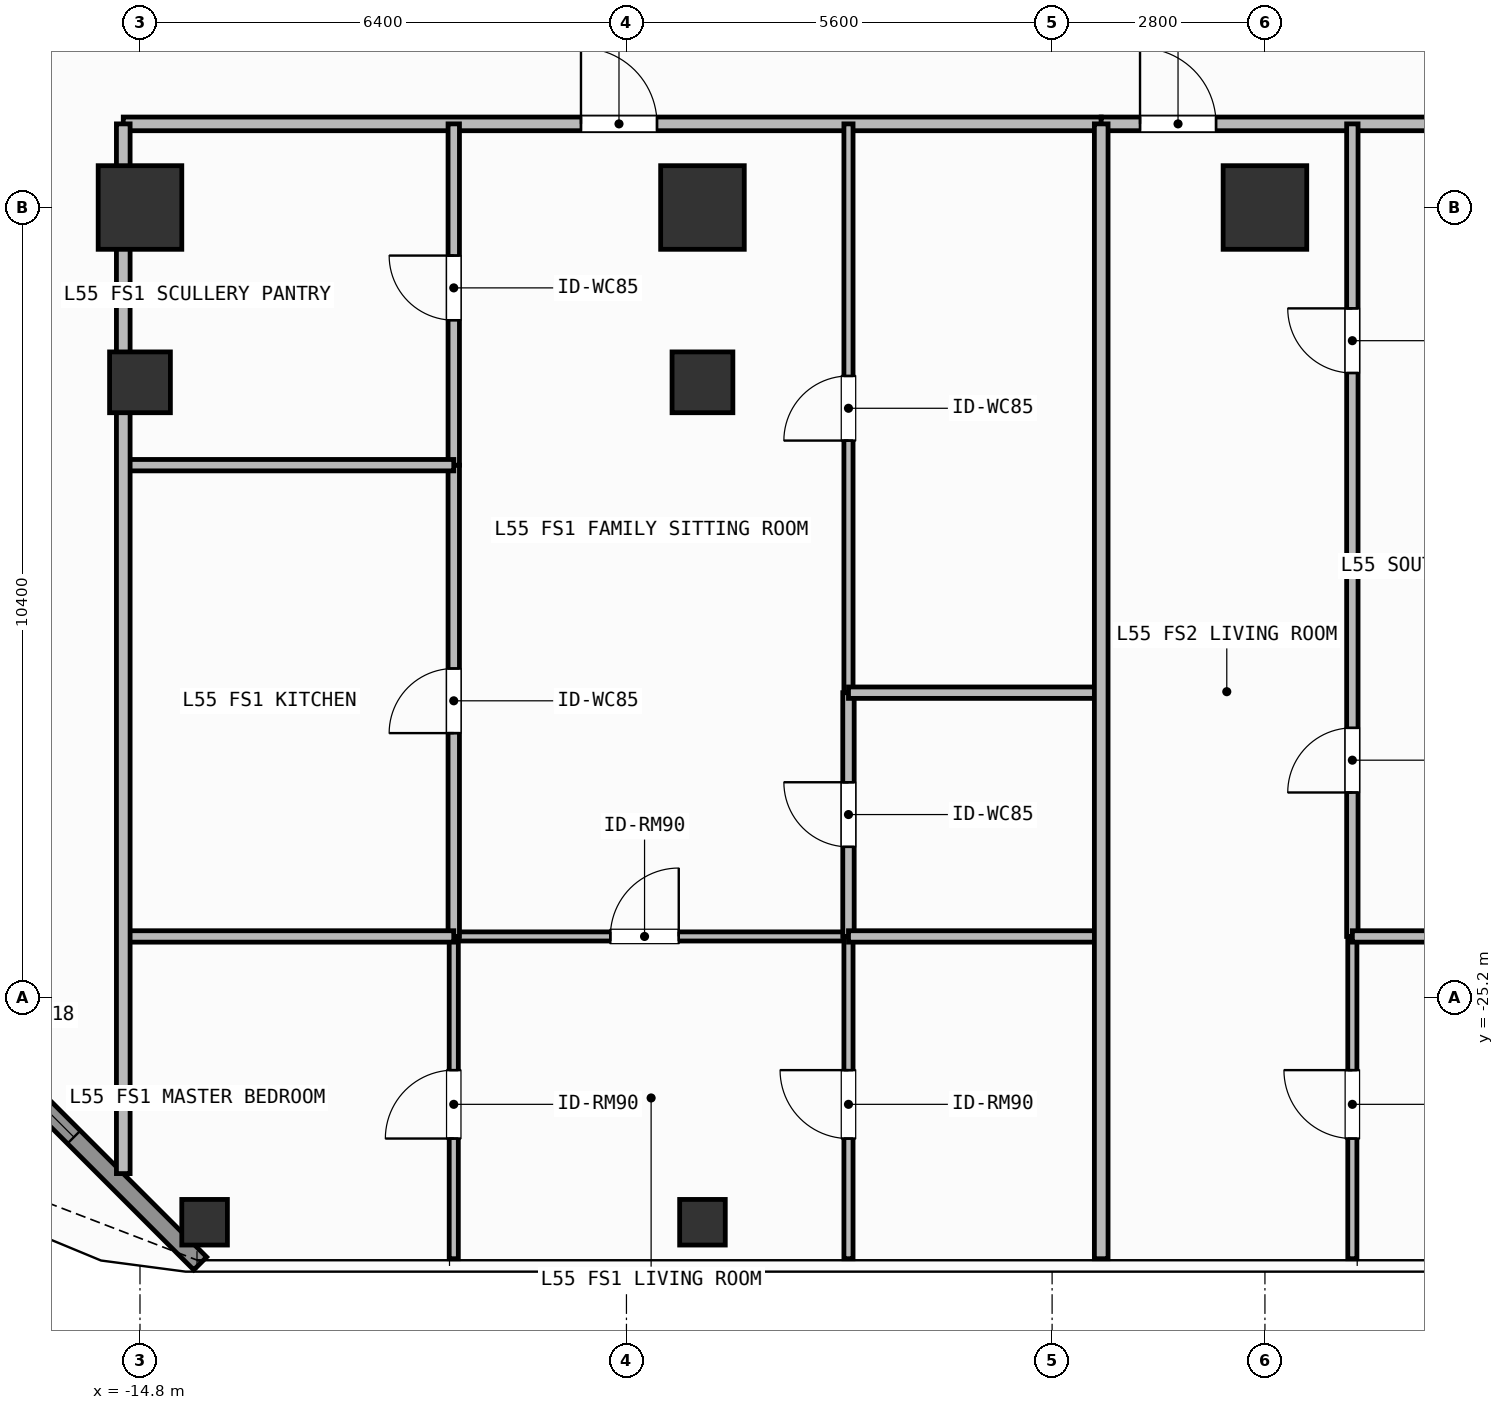
"""IFC4 building model, lengths in metres.
Left out: names, types, materials, properties, quantities, classifications, styles, units other than length and angle.
Written with IfcOpenShell. Run it as: python <this file> out.ifc"""

import sys

from ifc_helpers import new_model, si_unit, direction, frame, frame_2d, origin, origin_2d, place, context, subcontext, project, spatial, rectangle, hollow_rectangle, extrude, element, fill, save


model = new_model("IFC4")
c1 = context("Model", 3, precision=1e-05, world=origin(), true_north=direction((0.0, 1.0)))
c2 = subcontext(c1, "Body", "Model", "MODEL_VIEW")
j1 = project(units=[si_unit("LENGTHUNIT", "METRE"), si_unit("PLANEANGLEUNIT", "RADIAN")], contexts=[c1])
p1 = place(None, origin())
s1 = spatial("IfcSite", under=j1, at=p1, CompositionType="ELEMENT")
p2 = place(p1, origin())
s2 = spatial("IfcBuilding", under=s1, at=p2, CompositionType="ELEMENT")
p3 = place(p2, frame((0.0, 0.0, 223.5)))
s3 = spatial("IfcBuildingStorey", under=s2, at=p3, CompositionType="ELEMENT", Elevation=223.5)
for number, where, z_axis, x_axis in (
    (1, (-14.8, -14.8, 0.0), (0.0, 0.0, 1.0), (1.0, 0.0, 0.0)),
    (2, (-7.4, -14.8, 0.0), (0.0, 0.0, 1.0), (1.0, 0.0, 0.0)),
    (3, (0.0, -14.8, 0.0), (0.0, 0.0, 1.0), (1.0, 0.0, 0.0)),
):
    element("IfcColumn", number, at=place(p3, frame(where, z_axis=z_axis, x_axis=x_axis)), inside=s3, PredefinedType="COLUMN", context=c2, shape_type="SweptSolid", body=[
        extrude(rectangle(XDim=1.1, YDim=1.1, at=origin_2d()), origin(), (0.0, 0.0, 1.0), 3.9),
    ])
for number, where, z_axis, x_axis in (
    (4, (-14.8, -17.1, 0.0), (0.0, 0.0, 1.0), (1.0, 0.0, 0.0)),
    (5, (-7.4, -17.1, 0.0), (0.0, 0.0, 1.0), (1.0, 0.0, 0.0)),
):
    element("IfcColumn", number, at=place(p3, frame(where, z_axis=z_axis, x_axis=x_axis)), inside=s3, PredefinedType="COLUMN", context=c2, shape_type="SweptSolid", body=[
        extrude(hollow_rectangle(XDim=0.8, YDim=0.8, WallThickness=0.036, at=origin_2d()), origin(), (0.0, 0.0, 1.0), 3.9),
    ])
for number, where, z_axis, x_axis in (
    (6, (-13.95, -28.15, 0.0), (0.0, 0.0, 1.0), (1.0, 0.0, 0.0)),
    (7, (-7.4, -28.15, 0.0), (0.0, 0.0, 1.0), (1.0, 0.0, 0.0)),
):
    element("IfcColumn", number, at=place(p3, frame(where, z_axis=z_axis, x_axis=x_axis)), inside=s3, PredefinedType="COLUMN", context=c2, shape_type="SweptSolid", body=[
        extrude(hollow_rectangle(XDim=0.6, YDim=0.6, WallThickness=0.028, at=origin_2d()), origin(), (0.0, 0.0, 1.0), 3.9),
    ])
p4 = place(p3, frame((-14.008, -28.692, 0.0), z_axis=(0.0, 0.0, 1.0), x_axis=(-0.707106781187, 0.707106781187, 0.0)))
e8 = element("IfcWall", 8, at=p4, inside=s3, PredefinedType="SOLIDWALL", context=c2, shape_type="SweptSolid", body=[
    extrude(rectangle(XDim=6.201, YDim=0.24, at=frame_2d((3.101, 0.0))), origin(), (0.0, 0.0, 1.0), 3.68),
])
p5 = place(p4, frame((2.351, 0.0, 0.8)))
e9 = element("IfcOpeningElement", 9, at=p5, cuts=e8, PredefinedType="OPENING", context=c2, shape_type="SweptSolid", body=[
    extrude(rectangle(XDim=1.5, YDim=1.85, at=frame_2d((0.75, 0.925))), frame((0.0, 0.13, 0.0), z_axis=(0.0, -1.0, 0.0), x_axis=(1.0, 0.0, 0.0)), (0.0, 0.0, 1.0), 0.26),
])
p6 = place(p3, frame((-15.02, -13.7, 0.0), z_axis=(0.0, 0.0, 1.0), x_axis=(1.0, 0.0, 0.0)))
e10 = element("IfcWall", 10, at=p6, inside=s3, PredefinedType="PARTITIONING", context=c2, shape_type="SweptSolid", body=[
    extrude(rectangle(XDim=12.866, YDim=0.18, at=frame_2d((6.433, 0.0))), origin(), (0.0, 0.0, 1.0), 3.68),
])
p7 = place(p6, frame((6.022, 0.0, 0.0)))
e11 = element("IfcOpeningElement", 11, at=p7, cuts=e10, PredefinedType="OPENING", context=c2, shape_type="SweptSolid", body=[
    extrude(rectangle(XDim=1.0, YDim=2.2, at=frame_2d((0.5, 1.1))), frame((0.0, 0.1, 0.0), z_axis=(0.0, -1.0, 0.0), x_axis=(1.0, 0.0, 0.0)), (0.0, 0.0, 1.0), 0.2),
])
p8 = place(p3, frame((-10.672, -24.39, 0.0), z_axis=(0.0, 0.0, 1.0), x_axis=(1.0, 0.0, 0.0)))
e12 = element("IfcWall", 12, at=p8, inside=s3, PredefinedType="PARTITIONING", context=c2, shape_type="SweptSolid", body=[
    extrude(rectangle(XDim=5.193, YDim=0.12, at=frame_2d((2.597, 0.0))), origin(), (0.0, 0.0, 1.0), 3.68),
])
p9 = place(p8, frame((2.06, 0.0, 0.0)))
e13 = element("IfcOpeningElement", 13, at=p9, cuts=e12, PredefinedType="OPENING", context=c2, shape_type="SweptSolid", body=[
    extrude(rectangle(XDim=0.9, YDim=2.1, at=frame_2d((0.45, 1.05))), frame((0.0, 0.07, 0.0), z_axis=(0.0, -1.0, 0.0), x_axis=(1.0, 0.0, 0.0)), (0.0, 0.0, 1.0), 0.14),
])
p10 = place(p3, frame((-10.672, -24.39, 0.0), z_axis=(0.0, 0.0, 1.0), x_axis=(0.0, 1.0, 0.0)))
e14 = element("IfcWall", 14, at=p10, inside=s3, PredefinedType="PARTITIONING", context=c2, shape_type="SweptSolid", body=[
    extrude(rectangle(XDim=6.2, YDim=0.15, at=frame_2d((3.1, 0.0))), origin(), (0.0, 0.0, 1.0), 3.68),
])
p11 = place(p10, frame((2.675, 0.0, 0.0)))
e15 = element("IfcOpeningElement", 15, at=p11, cuts=e14, PredefinedType="OPENING", context=c2, shape_type="SweptSolid", body=[
    extrude(rectangle(XDim=0.85, YDim=2.1, at=frame_2d((0.425, 1.05))), frame((0.0, 0.085, 0.0), z_axis=(0.0, -1.0, 0.0), x_axis=(1.0, 0.0, 0.0)), (0.0, 0.0, 1.0), 0.17),
])
p12 = place(p3, frame((-10.672, -18.19, 0.0), z_axis=(0.0, 0.0, 1.0), x_axis=(0.0, 1.0, 0.0)))
e16 = element("IfcWall", 16, at=p12, inside=s3, PredefinedType="PARTITIONING", context=c2, shape_type="SweptSolid", body=[
    extrude(rectangle(XDim=4.49, YDim=0.15, at=frame_2d((2.245, 0.0))), origin(), (0.0, 0.0, 1.0), 3.68),
])
p13 = place(p12, frame((1.907, 0.0, 0.0)))
e17 = element("IfcOpeningElement", 17, at=p13, cuts=e16, PredefinedType="OPENING", context=c2, shape_type="SweptSolid", body=[
    extrude(rectangle(XDim=0.85, YDim=2.1, at=frame_2d((0.425, 1.05))), frame((0.0, 0.085, 0.0), z_axis=(0.0, -1.0, 0.0), x_axis=(1.0, 0.0, 0.0)), (0.0, 0.0, 1.0), 0.17),
])
p14 = place(p3, frame((-10.672, -28.63, 0.0), z_axis=(0.0, 0.0, 1.0), x_axis=(0.0, 1.0, 0.0)))
e18 = element("IfcWall", 18, at=p14, inside=s3, PredefinedType="PARTITIONING", context=c2, shape_type="SweptSolid", body=[
    extrude(rectangle(XDim=4.24, YDim=0.12, at=frame_2d((2.12, 0.0))), origin(), (0.0, 0.0, 1.0), 3.68),
])
p15 = place(p14, frame((1.581, 0.0, 0.0)))
e19 = element("IfcOpeningElement", 19, at=p15, cuts=e18, PredefinedType="OPENING", context=c2, shape_type="SweptSolid", body=[
    extrude(rectangle(XDim=0.9, YDim=2.1, at=frame_2d((0.45, 1.05))), frame((0.0, 0.07, 0.0), z_axis=(0.0, -1.0, 0.0), x_axis=(1.0, 0.0, 0.0)), (0.0, 0.0, 1.0), 0.14),
])
p16 = place(p3, frame((-5.479, -24.39, 0.0), z_axis=(0.0, 0.0, 1.0), x_axis=(0.0, 1.0, 0.0)))
e20 = element("IfcWall", 20, at=p16, inside=s3, PredefinedType="PARTITIONING", context=c2, shape_type="SweptSolid", body=[
    extrude(rectangle(XDim=3.207, YDim=0.15, at=frame_2d((1.604, 0.0))), origin(), (0.0, 0.0, 1.0), 3.68),
])
p17 = place(p16, frame((1.178, 0.0, 0.0)))
e21 = element("IfcOpeningElement", 21, at=p17, cuts=e20, PredefinedType="OPENING", context=c2, shape_type="SweptSolid", body=[
    extrude(rectangle(XDim=0.85, YDim=2.1, at=frame_2d((0.425, 1.05))), frame((0.0, 0.085, 0.0), z_axis=(0.0, -1.0, 0.0), x_axis=(1.0, 0.0, 0.0)), (0.0, 0.0, 1.0), 0.17),
])
p18 = place(p3, frame((-5.479, -21.183, 0.0), z_axis=(0.0, 0.0, 1.0), x_axis=(0.0, 1.0, 0.0)))
e22 = element("IfcWall", 22, at=p18, inside=s3, PredefinedType="PARTITIONING", context=c2, shape_type="SweptSolid", body=[
    extrude(rectangle(XDim=7.483, YDim=0.12, at=frame_2d((3.742, 0.0))), origin(), (0.0, 0.0, 1.0), 3.68),
])
p19 = place(p18, frame((3.316, 0.0, 0.0)))
e23 = element("IfcOpeningElement", 23, at=p19, cuts=e22, PredefinedType="OPENING", context=c2, shape_type="SweptSolid", body=[
    extrude(rectangle(XDim=0.85, YDim=2.1, at=frame_2d((0.425, 1.05))), frame((0.0, 0.07, 0.0), z_axis=(0.0, -1.0, 0.0), x_axis=(1.0, 0.0, 0.0)), (0.0, 0.0, 1.0), 0.14),
])
p20 = place(p3, frame((-5.479, -28.63, 0.0), z_axis=(0.0, 0.0, 1.0), x_axis=(0.0, 1.0, 0.0)))
e24 = element("IfcWall", 24, at=p20, inside=s3, PredefinedType="PARTITIONING", context=c2, shape_type="SweptSolid", body=[
    extrude(rectangle(XDim=4.24, YDim=0.12, at=frame_2d((2.12, 0.0))), origin(), (0.0, 0.0, 1.0), 3.68),
])
p21 = place(p20, frame((1.581, 0.0, 0.0)))
e25 = element("IfcOpeningElement", 25, at=p21, cuts=e24, PredefinedType="OPENING", context=c2, shape_type="SweptSolid", body=[
    extrude(rectangle(XDim=0.9, YDim=2.1, at=frame_2d((0.45, 1.05))), frame((0.0, 0.07, 0.0), z_axis=(0.0, -1.0, 0.0), x_axis=(1.0, 0.0, 0.0)), (0.0, 0.0, 1.0), 0.14),
])
p22 = place(p3, frame((-2.154, -13.7, 0.0), z_axis=(0.0, 0.0, 1.0), x_axis=(1.0, 0.0, 0.0)))
e26 = element("IfcWall", 26, at=p22, inside=s3, PredefinedType="PARTITIONING", context=c2, shape_type="SweptSolid", body=[
    extrude(rectangle(XDim=6.054, YDim=0.18, at=frame_2d((3.027, 0.0))), origin(), (0.0, 0.0, 1.0), 3.68),
])
p23 = place(p22, frame((0.511, 0.0, 0.0)))
e27 = element("IfcOpeningElement", 27, at=p23, cuts=e26, PredefinedType="OPENING", context=c2, shape_type="SweptSolid", body=[
    extrude(rectangle(XDim=1.0, YDim=2.2, at=frame_2d((0.5, 1.1))), frame((0.0, 0.1, 0.0), z_axis=(0.0, -1.0, 0.0), x_axis=(1.0, 0.0, 0.0)), (0.0, 0.0, 1.0), 0.2),
])
p24 = place(p3, frame((1.15, -19.579, 0.0), z_axis=(0.0, 0.0, 1.0), x_axis=(0.0, 1.0, 0.0)))
e28 = element("IfcWall", 28, at=p24, inside=s3, PredefinedType="PARTITIONING", context=c2, shape_type="SweptSolid", body=[
    extrude(rectangle(XDim=5.879, YDim=0.15, at=frame_2d((2.939, 0.0))), origin(), (0.0, 0.0, 1.0), 3.68),
])
p25 = place(p24, frame((2.602, 0.0, 0.0)))
e29 = element("IfcOpeningElement", 29, at=p25, cuts=e28, PredefinedType="OPENING", context=c2, shape_type="SweptSolid", body=[
    extrude(rectangle(XDim=0.85, YDim=2.1, at=frame_2d((0.425, 1.05))), frame((0.0, 0.085, 0.0), z_axis=(0.0, -1.0, 0.0), x_axis=(1.0, 0.0, 0.0)), (0.0, 0.0, 1.0), 0.17),
])
p26 = place(p3, frame((1.15, -24.39, 0.0), z_axis=(0.0, 0.0, 1.0), x_axis=(0.0, 1.0, 0.0)))
e30 = element("IfcWall", 30, at=p26, inside=s3, PredefinedType="PARTITIONING", context=c2, shape_type="SweptSolid", body=[
    extrude(rectangle(XDim=4.811, YDim=0.15, at=frame_2d((2.405, 0.0))), origin(), (0.0, 0.0, 1.0), 3.68),
])
p27 = place(p26, frame((1.894, 0.0, 0.0)))
e31 = element("IfcOpeningElement", 31, at=p27, cuts=e30, PredefinedType="OPENING", context=c2, shape_type="SweptSolid", body=[
    extrude(rectangle(XDim=0.85, YDim=2.1, at=frame_2d((0.425, 1.05))), frame((0.0, 0.085, 0.0), z_axis=(0.0, -1.0, 0.0), x_axis=(1.0, 0.0, 0.0)), (0.0, 0.0, 1.0), 0.17),
])
p28 = place(p3, frame((1.15, -28.63, 0.0), z_axis=(0.0, 0.0, 1.0), x_axis=(0.0, 1.0, 0.0)))
e32 = element("IfcWall", 32, at=p28, inside=s3, PredefinedType="PARTITIONING", context=c2, shape_type="SweptSolid", body=[
    extrude(rectangle(XDim=4.24, YDim=0.12, at=frame_2d((2.12, 0.0))), origin(), (0.0, 0.0, 1.0), 3.68),
])
p29 = place(p28, frame((1.581, 0.0, 0.0)))
e33 = element("IfcOpeningElement", 33, at=p29, cuts=e32, PredefinedType="OPENING", context=c2, shape_type="SweptSolid", body=[
    extrude(rectangle(XDim=0.9, YDim=2.1, at=frame_2d((0.45, 1.05))), frame((0.0, 0.07, 0.0), z_axis=(0.0, -1.0, 0.0), x_axis=(1.0, 0.0, 0.0)), (0.0, 0.0, 1.0), 0.14),
])
for number, where, z_axis, x_axis in (
    (34, (-15.02, -18.19, 0.0), (0.0, 0.0, 1.0), (1.0, 0.0, 0.0)),
    (35, (-15.02, -24.39, 0.0), (0.0, 0.0, 1.0), (1.0, 0.0, 0.0)),
):
    element("IfcWall", number, at=place(p3, frame(where, z_axis=z_axis, x_axis=x_axis)), inside=s3, PredefinedType="PARTITIONING", context=c2, shape_type="SweptSolid", body=[
        extrude(rectangle(XDim=4.348, YDim=0.15, at=frame_2d((2.174, 0.0))), origin(), (0.0, 0.0, 1.0), 3.68),
    ])
for number, where, z_axis, x_axis in (
    (36, (-5.479, -21.183, 0.0), (0.0, 0.0, 1.0), (1.0, 0.0, 0.0)),
    (37, (-5.479, -24.39, 0.0), (0.0, 0.0, 1.0), (1.0, 0.0, 0.0)),
):
    element("IfcWall", number, at=place(p3, frame(where, z_axis=z_axis, x_axis=x_axis)), inside=s3, PredefinedType="PARTITIONING", context=c2, shape_type="SweptSolid", body=[
        extrude(rectangle(XDim=3.325, YDim=0.15, at=frame_2d((1.663, 0.0))), origin(), (0.0, 0.0, 1.0), 3.68),
    ])
for number, where, z_axis, x_axis in (
    (38, (1.15, -19.579, 0.0), (0.0, 0.0, 1.0), (1.0, 0.0, 0.0)),
    (39, (1.15, -24.39, 0.0), (0.0, 0.0, 1.0), (1.0, 0.0, 0.0)),
):
    element("IfcWall", number, at=place(p3, frame(where, z_axis=z_axis, x_axis=x_axis)), inside=s3, PredefinedType="PARTITIONING", context=c2, shape_type="SweptSolid", body=[
        extrude(rectangle(XDim=2.75, YDim=0.15, at=frame_2d((1.375, 0.0))), origin(), (0.0, 0.0, 1.0), 3.68),
    ])
p30 = place(p3, frame((-2.154, -28.63, 0.0), z_axis=(0.0, 0.0, 1.0), x_axis=(0.0, 1.0, 0.0)))
e40 = element("IfcWall", 40, at=p30, inside=s3, PredefinedType="PARTITIONING", context=c2, shape_type="SweptSolid", body=[
    extrude(rectangle(XDim=14.93, YDim=0.18, at=frame_2d((7.465, 0.0))), origin(), (0.0, 0.0, 1.0), 3.68),
])
p31 = place(p3, frame((-15.02, -27.51, 0.0), z_axis=(0.0, 0.0, 1.0), x_axis=(0.0, 1.0, 0.0)))
e41 = element("IfcWall", 41, at=p31, inside=s3, PredefinedType="PARTITIONING", context=c2, shape_type="SweptSolid", body=[
    extrude(rectangle(XDim=13.81, YDim=0.18, at=frame_2d((6.905, 0.0))), origin(), (0.0, 0.0, 1.0), 3.68),
])
p32 = place(p5, origin())
e42 = element("IfcWindow", 42, at=p32, inside=s3, PartitioningType="SINGLE_PANEL", PredefinedType="WINDOW", context=c2, shape_type="SweptSolid", body=[
    extrude(rectangle(XDim=1.5, YDim=1.85, at=frame_2d((0.75, 0.925))), frame((0.0, 0.03, 0.0), z_axis=(0.0, -1.0, 0.0), x_axis=(1.0, 0.0, 0.0)), (0.0, 0.0, 1.0), 0.06),
])
fill(e9, e42)
p33 = place(p7, origin())
e43 = element("IfcDoor", 43, at=p33, inside=s3, OperationType="SINGLE_SWING_LEFT", PredefinedType="DOOR", context=c2, shape_type="SweptSolid", body=[
    extrude(rectangle(XDim=1.0, YDim=2.2, at=frame_2d((0.5, 1.1))), frame((0.0, 0.025, 0.0), z_axis=(0.0, -1.0, 0.0), x_axis=(1.0, 0.0, 0.0)), (0.0, 0.0, 1.0), 0.05),
])
fill(e11, e43)
p34 = place(p9, origin())
e44 = element("IfcDoor", 44, at=p34, inside=s3, OperationType="SINGLE_SWING_RIGHT", PredefinedType="DOOR", context=c2, shape_type="SweptSolid", body=[
    extrude(rectangle(XDim=0.9, YDim=2.1, at=frame_2d((0.45, 1.05))), frame((0.0, 0.025, 0.0), z_axis=(0.0, -1.0, 0.0), x_axis=(1.0, 0.0, 0.0)), (0.0, 0.0, 1.0), 0.05),
])
fill(e13, e44)
p35 = place(p11, origin())
e45 = element("IfcDoor", 45, at=p35, inside=s3, OperationType="SINGLE_SWING_LEFT", PredefinedType="DOOR", context=c2, shape_type="SweptSolid", body=[
    extrude(rectangle(XDim=0.85, YDim=2.1, at=frame_2d((0.425, 1.05))), frame((0.0, 0.025, 0.0), z_axis=(0.0, -1.0, 0.0), x_axis=(1.0, 0.0, 0.0)), (0.0, 0.0, 1.0), 0.05),
])
fill(e15, e45)
p36 = place(p13, origin())
e46 = element("IfcDoor", 46, at=p36, inside=s3, OperationType="SINGLE_SWING_RIGHT", PredefinedType="DOOR", context=c2, shape_type="SweptSolid", body=[
    extrude(rectangle(XDim=0.85, YDim=2.1, at=frame_2d((0.425, 1.05))), frame((0.0, 0.025, 0.0), z_axis=(0.0, -1.0, 0.0), x_axis=(1.0, 0.0, 0.0)), (0.0, 0.0, 1.0), 0.05),
])
fill(e17, e46)
p37 = place(p15, origin())
e47 = element("IfcDoor", 47, at=p37, inside=s3, OperationType="SINGLE_SWING_LEFT", PredefinedType="DOOR", context=c2, shape_type="SweptSolid", body=[
    extrude(rectangle(XDim=0.9, YDim=2.1, at=frame_2d((0.45, 1.05))), frame((0.0, 0.025, 0.0), z_axis=(0.0, -1.0, 0.0), x_axis=(1.0, 0.0, 0.0)), (0.0, 0.0, 1.0), 0.05),
])
fill(e19, e47)
p38 = place(p17, origin())
e48 = element("IfcDoor", 48, at=p38, inside=s3, OperationType="SINGLE_SWING_RIGHT", PredefinedType="DOOR", context=c2, shape_type="SweptSolid", body=[
    extrude(rectangle(XDim=0.85, YDim=2.1, at=frame_2d((0.425, 1.05))), frame((0.0, 0.025, 0.0), z_axis=(0.0, -1.0, 0.0), x_axis=(1.0, 0.0, 0.0)), (0.0, 0.0, 1.0), 0.05),
])
fill(e21, e48)
p39 = place(p19, origin())
e49 = element("IfcDoor", 49, at=p39, inside=s3, OperationType="SINGLE_SWING_LEFT", PredefinedType="DOOR", context=c2, shape_type="SweptSolid", body=[
    extrude(rectangle(XDim=0.85, YDim=2.1, at=frame_2d((0.425, 1.05))), frame((0.0, 0.025, 0.0), z_axis=(0.0, -1.0, 0.0), x_axis=(1.0, 0.0, 0.0)), (0.0, 0.0, 1.0), 0.05),
])
fill(e23, e49)
p40 = place(p21, origin())
e50 = element("IfcDoor", 50, at=p40, inside=s3, OperationType="SINGLE_SWING_RIGHT", PredefinedType="DOOR", context=c2, shape_type="SweptSolid", body=[
    extrude(rectangle(XDim=0.9, YDim=2.1, at=frame_2d((0.45, 1.05))), frame((0.0, 0.025, 0.0), z_axis=(0.0, -1.0, 0.0), x_axis=(1.0, 0.0, 0.0)), (0.0, 0.0, 1.0), 0.05),
])
fill(e25, e50)
p41 = place(p23, origin())
e51 = element("IfcDoor", 51, at=p41, inside=s3, OperationType="SINGLE_SWING_LEFT", PredefinedType="DOOR", context=c2, shape_type="SweptSolid", body=[
    extrude(rectangle(XDim=1.0, YDim=2.2, at=frame_2d((0.5, 1.1))), frame((0.0, 0.025, 0.0), z_axis=(0.0, -1.0, 0.0), x_axis=(1.0, 0.0, 0.0)), (0.0, 0.0, 1.0), 0.05),
])
fill(e27, e51)
p42 = place(p25, origin())
e52 = element("IfcDoor", 52, at=p42, inside=s3, OperationType="SINGLE_SWING_RIGHT", PredefinedType="DOOR", context=c2, shape_type="SweptSolid", body=[
    extrude(rectangle(XDim=0.85, YDim=2.1, at=frame_2d((0.425, 1.05))), frame((0.0, 0.025, 0.0), z_axis=(0.0, -1.0, 0.0), x_axis=(1.0, 0.0, 0.0)), (0.0, 0.0, 1.0), 0.05),
])
fill(e29, e52)
p43 = place(p27, origin())
e53 = element("IfcDoor", 53, at=p43, inside=s3, OperationType="SINGLE_SWING_LEFT", PredefinedType="DOOR", context=c2, shape_type="SweptSolid", body=[
    extrude(rectangle(XDim=0.85, YDim=2.1, at=frame_2d((0.425, 1.05))), frame((0.0, 0.025, 0.0), z_axis=(0.0, -1.0, 0.0), x_axis=(1.0, 0.0, 0.0)), (0.0, 0.0, 1.0), 0.05),
])
fill(e31, e53)
p44 = place(p29, origin())
e54 = element("IfcDoor", 54, at=p44, inside=s3, OperationType="SINGLE_SWING_RIGHT", PredefinedType="DOOR", context=c2, shape_type="SweptSolid", body=[
    extrude(rectangle(XDim=0.9, YDim=2.1, at=frame_2d((0.45, 1.05))), frame((0.0, 0.025, 0.0), z_axis=(0.0, -1.0, 0.0), x_axis=(1.0, 0.0, 0.0)), (0.0, 0.0, 1.0), 0.05),
])
fill(e33, e54)
save(model, sys.argv[1])
